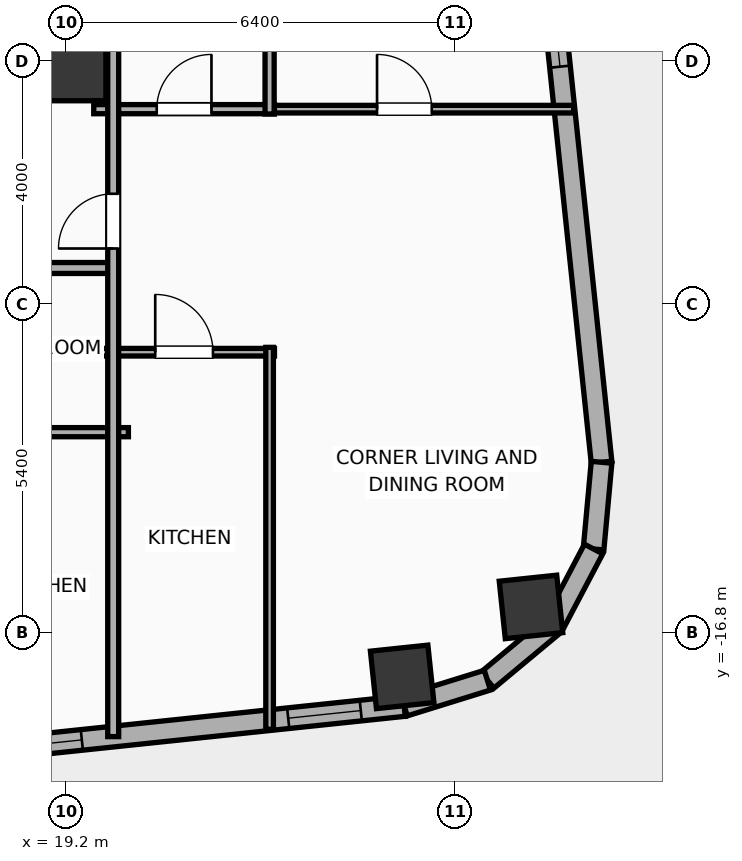
"""IFC4 building model, lengths in metres.
Left out: names, types, materials, properties, quantities, classifications, styles, units other than length and angle.
Written with IfcOpenShell. Run it as: python <this file> out.ifc"""

import sys

from ifc_helpers import new_model, si_unit, direction, frame, frame_2d, origin, origin_2d, place, context, subcontext, project, spatial, rectangle, hollow_rectangle, hollow_circle, extrude, element, fill, save


model = new_model("IFC4")
c1 = context("Model", 3, precision=1e-05, world=origin(), true_north=direction((0.0, 1.0)))
c2 = subcontext(c1, "Body", "Model", "MODEL_VIEW")
j1 = project(units=[si_unit("LENGTHUNIT", "METRE"), si_unit("PLANEANGLEUNIT", "RADIAN")], contexts=[c1])
p1 = place(None, origin())
s1 = spatial("IfcSite", under=j1, at=p1, CompositionType="ELEMENT")
p2 = place(p1, origin())
s2 = spatial("IfcBuilding", under=s1, at=p2, CompositionType="ELEMENT")
p3 = place(p2, frame((0.0, 0.0, 140.4)))
s3 = spatial("IfcBuildingStorey", under=s2, at=p3, CompositionType="ELEMENT", Elevation=140.4)
p4 = place(p3, frame((19.2, -7.4, 0.0), z_axis=(0.0, 0.0, 1.0), x_axis=(1.0, 0.0, 0.0)))
e1 = element("IfcColumn", 1, at=p4, inside=s3, PredefinedType="COLUMN", context=c2, shape_type="SweptSolid", body=[
    extrude(rectangle(XDim=1.3, YDim=1.3, at=origin_2d()), origin(), (0.0, 0.0, 1.0), 3.9),
])
p5 = place(p3, frame((12.125, -7.4, 0.0), z_axis=(0.0, 0.0, 1.0), x_axis=(1.0, 0.0, 0.0)))
e2 = element("IfcWall", 2, at=p5, inside=s3, PredefinedType="SHEAR", context=c2, shape_type="SweptSolid", body=[
    extrude(rectangle(XDim=7.35, YDim=0.55, at=frame_2d((3.675, 0.0))), origin(), (0.0, 0.0, 1.0), 3.65),
])
p6 = place(p3, frame((19.145, -7.4, 0.0), z_axis=(0.0, 0.0, 1.0), x_axis=(0.0, 1.0, 0.0)))
e3 = element("IfcWall", 3, at=p6, inside=s3, PredefinedType="SHEAR", context=c2, shape_type="SweptSolid", body=[
    extrude(rectangle(XDim=14.8, YDim=0.65, at=frame_2d((7.4, 0.0))), origin(), (0.0, 0.0, 1.0), 3.65),
])
p7 = place(p3, frame((24.722, -17.524, -0.4), z_axis=(0.0, 0.0, 1.0), x_axis=(0.994521895368, 0.104528463268, 0.0)))
e4 = element("IfcColumn", 4, at=p7, inside=s3, PredefinedType="COLUMN", context=c2, shape_type="SweptSolid", body=[
    extrude(hollow_rectangle(XDim=0.95, YDim=0.95, WallThickness=0.032, at=origin_2d()), origin(), (0.0, 0.0, 1.0), 4.3),
])
p8 = place(p3, frame((26.841, -16.374, -0.4), z_axis=(0.0, 0.0, 1.0), x_axis=(0.994521895368, 0.104528463268, 0.0)))
e5 = element("IfcColumn", 5, at=p8, inside=s3, PredefinedType="COLUMN", context=c2, shape_type="SweptSolid", body=[
    extrude(hollow_circle(Radius=0.475, WallThickness=0.032, at=origin_2d()), origin(), (0.0, 0.0, 1.0), 4.3),
])
p9 = place(p3, frame((24.756, -18.003, 0.0), z_axis=(0.0, 0.0, 1.0), x_axis=(-0.99452160744, -0.104531202687, 0.0)))
e6 = element("IfcWall", 6, at=p9, inside=s3, PredefinedType="ELEMENTEDWALL", context=c2, shape_type="SweptSolid", body=[
    extrude(rectangle(XDim=51.967, YDim=0.34, at=frame_2d((25.983, 0.0))), origin(), (0.0, 0.0, 1.0), 2.54),
])
p10 = place(p9, frame((14.84, 0.0, 0.0)))
e7 = element("IfcOpeningElement", 7, at=p10, cuts=e6, PredefinedType="OPENING", context=c2, shape_type="SweptSolid", body=[
    extrude(rectangle(XDim=1.5, YDim=2.05, at=frame_2d((0.75, 1.025))), frame((0.0, 0.18, 0.0), z_axis=(0.0, -1.0, 0.0), x_axis=(1.0, 0.0, 0.0)), (0.0, 0.0, 1.0), 0.36),
])
p11 = place(p9, frame((25.633, 0.0, 0.75)))
e8 = element("IfcOpeningElement", 8, at=p11, cuts=e6, PredefinedType="OPENING", context=c2, shape_type="SweptSolid", body=[
    extrude(rectangle(XDim=2.4, YDim=1.63, at=frame_2d((1.2, 0.815))), frame((0.0, 0.18, 0.0), z_axis=(0.0, -1.0, 0.0), x_axis=(1.0, 0.0, 0.0)), (0.0, 0.0, 1.0), 0.36),
])
p12 = place(p9, frame((42.955, 0.0, 0.75)))
e9 = element("IfcOpeningElement", 9, at=p12, cuts=e6, PredefinedType="OPENING", context=c2, shape_type="SweptSolid", body=[
    extrude(rectangle(XDim=2.4, YDim=1.63, at=frame_2d((1.2, 0.815))), frame((0.0, 0.18, 0.0), z_axis=(0.0, -1.0, 0.0), x_axis=(1.0, 0.0, 0.0)), (0.0, 0.0, 1.0), 0.36),
])
p13 = place(p9, frame((34.121, 0.0, 0.75)))
e10 = element("IfcOpeningElement", 10, at=p13, cuts=e6, PredefinedType="OPENING", context=c2, shape_type="SweptSolid", body=[
    extrude(rectangle(XDim=1.2, YDim=1.63, at=frame_2d((0.6, 0.815))), frame((0.0, 0.18, 0.0), z_axis=(0.0, -1.0, 0.0), x_axis=(1.0, 0.0, 0.0)), (0.0, 0.0, 1.0), 0.36),
])
p14 = place(p9, frame((37.092, 0.0, 0.75)))
e11 = element("IfcOpeningElement", 11, at=p14, cuts=e6, PredefinedType="OPENING", context=c2, shape_type="SweptSolid", body=[
    extrude(rectangle(XDim=1.2, YDim=1.63, at=frame_2d((0.6, 0.815))), frame((0.0, 0.18, 0.0), z_axis=(0.0, -1.0, 0.0), x_axis=(1.0, 0.0, 0.0)), (0.0, 0.0, 1.0), 0.36),
])
p15 = place(p9, frame((11.388, 0.0, 0.75)))
e12 = element("IfcOpeningElement", 12, at=p15, cuts=e6, PredefinedType="OPENING", context=c2, shape_type="SweptSolid", body=[
    extrude(rectangle(XDim=1.2, YDim=1.63, at=frame_2d((0.6, 0.815))), frame((0.0, 0.18, 0.0), z_axis=(0.0, -1.0, 0.0), x_axis=(1.0, 0.0, 0.0)), (0.0, 0.0, 1.0), 0.36),
])
p16 = place(p9, frame((8.332, 0.0, 0.75)))
e13 = element("IfcOpeningElement", 13, at=p16, cuts=e6, PredefinedType="OPENING", context=c2, shape_type="SweptSolid", body=[
    extrude(rectangle(XDim=1.2, YDim=1.63, at=frame_2d((0.6, 0.815))), frame((0.0, 0.18, 0.0), z_axis=(0.0, -1.0, 0.0), x_axis=(1.0, 0.0, 0.0)), (0.0, 0.0, 1.0), 0.36),
])
p17 = place(p9, frame((5.331, 0.0, 0.75)))
e14 = element("IfcOpeningElement", 14, at=p17, cuts=e6, PredefinedType="OPENING", context=c2, shape_type="SweptSolid", body=[
    extrude(rectangle(XDim=1.2, YDim=1.63, at=frame_2d((0.6, 0.815))), frame((0.0, 0.18, 0.0), z_axis=(0.0, -1.0, 0.0), x_axis=(1.0, 0.0, 0.0)), (0.0, 0.0, 1.0), 0.36),
])
p18 = place(p9, frame((29.313, 0.0, 0.75)))
e15 = element("IfcOpeningElement", 15, at=p18, cuts=e6, PredefinedType="OPENING", context=c2, shape_type="SweptSolid", body=[
    extrude(rectangle(XDim=1.2, YDim=1.63, at=frame_2d((0.6, 0.815))), frame((0.0, 0.18, 0.0), z_axis=(0.0, -1.0, 0.0), x_axis=(1.0, 0.0, 0.0)), (0.0, 0.0, 1.0), 0.36),
])
p19 = place(p9, frame((22.248, 0.0, 0.75)))
e16 = element("IfcOpeningElement", 16, at=p19, cuts=e6, PredefinedType="OPENING", context=c2, shape_type="SweptSolid", body=[
    extrude(rectangle(XDim=1.2, YDim=1.63, at=frame_2d((0.6, 0.815))), frame((0.0, 0.18, 0.0), z_axis=(0.0, -1.0, 0.0), x_axis=(1.0, 0.0, 0.0)), (0.0, 0.0, 1.0), 0.36),
])
p20 = place(p9, frame((18.186, 0.0, 0.75)))
e17 = element("IfcOpeningElement", 17, at=p20, cuts=e6, PredefinedType="OPENING", context=c2, shape_type="SweptSolid", body=[
    extrude(rectangle(XDim=1.2, YDim=1.63, at=frame_2d((0.6, 0.815))), frame((0.0, 0.18, 0.0), z_axis=(0.0, -1.0, 0.0), x_axis=(1.0, 0.0, 0.0)), (0.0, 0.0, 1.0), 0.36),
])
p21 = place(p9, frame((0.718, 0.0, 0.75)))
e18 = element("IfcOpeningElement", 18, at=p21, cuts=e6, PredefinedType="OPENING", context=c2, shape_type="SweptSolid", body=[
    extrude(rectangle(XDim=1.2, YDim=1.63, at=frame_2d((0.6, 0.815))), frame((0.0, 0.18, 0.0), z_axis=(0.0, -1.0, 0.0), x_axis=(1.0, 0.0, 0.0)), (0.0, 0.0, 1.0), 0.36),
])
p22 = place(p3, frame((24.534, 18.99, 0.0), z_axis=(0.0, 0.0, 1.0), x_axis=(0.104534959766, -0.994521212537, 0.0)))
e19 = element("IfcWall", 19, at=p22, inside=s3, PredefinedType="ELEMENTEDWALL", context=c2, shape_type="SweptSolid", body=[
    extrude(rectangle(XDim=33.166, YDim=0.34, at=frame_2d((16.583, 0.0))), origin(), (0.0, 0.0, 1.0), 2.54),
])
p23 = place(p22, frame((6.542, 0.0, 0.75)))
e20 = element("IfcOpeningElement", 20, at=p23, cuts=e19, PredefinedType="OPENING", context=c2, shape_type="SweptSolid", body=[
    extrude(rectangle(XDim=1.8, YDim=1.63, at=frame_2d((0.9, 0.815))), frame((0.0, 0.18, 0.0), z_axis=(0.0, -1.0, 0.0), x_axis=(1.0, 0.0, 0.0)), (0.0, 0.0, 1.0), 0.36),
])
p24 = place(p22, frame((24.825, 0.0, 0.75)))
e21 = element("IfcOpeningElement", 21, at=p24, cuts=e19, PredefinedType="OPENING", context=c2, shape_type="SweptSolid", body=[
    extrude(rectangle(XDim=1.8, YDim=1.63, at=frame_2d((0.9, 0.815))), frame((0.0, 0.18, 0.0), z_axis=(0.0, -1.0, 0.0), x_axis=(1.0, 0.0, 0.0)), (0.0, 0.0, 1.0), 0.36),
])
p25 = place(p3, frame((28.001, -13.995, 0.0), z_axis=(0.0, 0.0, 1.0), x_axis=(-0.091534682358, -0.995801888894, 0.0)))
e22 = element("IfcWall", 22, at=p25, inside=s3, PredefinedType="ELEMENTEDWALL", context=c2, shape_type="SweptSolid", body=[
    extrude(rectangle(XDim=1.432, YDim=0.34, at=frame_2d((0.716, 0.0))), origin(), (0.0, 0.0, 1.0), 3.65),
])
p26 = place(p3, frame((27.87, -15.421, 0.0), z_axis=(0.0, 0.0, 1.0), x_axis=(-0.465682431293, -0.884951904447, 0.0)))
e23 = element("IfcWall", 23, at=p26, inside=s3, PredefinedType="ELEMENTEDWALL", context=c2, shape_type="SweptSolid", body=[
    extrude(rectangle(XDim=1.415, YDim=0.34, at=frame_2d((0.708, 0.0))), origin(), (0.0, 0.0, 1.0), 3.65),
])
p27 = place(p3, frame((27.211, -16.674, 0.0), z_axis=(0.0, 0.0, 1.0), x_axis=(-0.768758372808, -0.639539337522, 0.0)))
e24 = element("IfcWall", 24, at=p27, inside=s3, PredefinedType="ELEMENTEDWALL", context=c2, shape_type="SweptSolid", body=[
    extrude(rectangle(XDim=1.415, YDim=0.34, at=frame_2d((0.708, 0.0))), origin(), (0.0, 0.0, 1.0), 2.54),
])
p28 = place(p3, frame((26.123, -17.579, 0.0), z_axis=(0.0, 0.0, 1.0), x_axis=(-0.955042500381, -0.296468923271, 0.0)))
e25 = element("IfcWall", 25, at=p28, inside=s3, PredefinedType="ELEMENTEDWALL", context=c2, shape_type="SweptSolid", body=[
    extrude(rectangle(XDim=1.432, YDim=0.34, at=frame_2d((0.716, 0.0))), origin(), (0.0, 0.0, 1.0), 2.54),
])
p29 = place(p3, frame((17.67, -13.5, 0.0), z_axis=(0.0, 0.0, 1.0), x_axis=(1.0, 0.0, 0.0)))
e26 = element("IfcWall", 26, at=p29, inside=s3, PredefinedType="PLUMBINGWALL", context=c2, shape_type="SweptSolid", body=[
    extrude(rectangle(XDim=2.55, YDim=0.15, at=frame_2d((1.275, 0.0))), origin(), (0.0, 0.0, 1.0), 3.65),
])
p30 = place(p3, frame((8.08, -10.8, 0.0), z_axis=(0.0, 0.0, 1.0), x_axis=(1.0, 0.0, 0.0)))
e27 = element("IfcWall", 27, at=p30, inside=s3, PredefinedType="PARTITIONING", context=c2, shape_type="SweptSolid", body=[
    extrude(rectangle(XDim=11.92, YDim=0.18, at=frame_2d((5.96, 0.0))), origin(), (0.0, 0.0, 1.0), 3.65),
])
p31 = place(p30, frame((1.251, 0.0, 0.0)))
e28 = element("IfcOpeningElement", 28, at=p31, cuts=e27, PredefinedType="OPENING", context=c2, shape_type="SweptSolid", body=[
    extrude(rectangle(XDim=1.15, YDim=2.05, at=frame_2d((0.575, 1.025))), frame((0.0, 0.1, 0.0), z_axis=(0.0, -1.0, 0.0), x_axis=(1.0, 0.0, 0.0)), (0.0, 0.0, 1.0), 0.2),
])
p32 = place(p30, frame((7.244, 0.0, 0.0)))
e29 = element("IfcOpeningElement", 29, at=p32, cuts=e27, PredefinedType="OPENING", context=c2, shape_type="SweptSolid", body=[
    extrude(rectangle(XDim=1.15, YDim=2.05, at=frame_2d((0.575, 1.025))), frame((0.0, 0.1, 0.0), z_axis=(0.0, -1.0, 0.0), x_axis=(1.0, 0.0, 0.0)), (0.0, 0.0, 1.0), 0.2),
])
p33 = place(p3, frame((22.482, -8.188, 0.0), z_axis=(0.0, 0.0, 1.0), x_axis=(1.0, 0.0, 0.0)))
e30 = element("IfcWall", 30, at=p33, inside=s3, PredefinedType="PARTITIONING", context=c2, shape_type="SweptSolid", body=[
    extrude(rectangle(XDim=5.06, YDim=0.125, at=frame_2d((2.53, 0.0))), origin(), (0.0, 0.0, 1.0), 3.65),
])
p34 = place(p33, frame((1.827, 0.0, 0.0)))
e31 = element("IfcOpeningElement", 31, at=p34, cuts=e30, PredefinedType="OPENING", context=c2, shape_type="SweptSolid", body=[
    extrude(rectangle(XDim=0.9, YDim=2.05, at=frame_2d((0.45, 1.025))), frame((0.0, 0.073, 0.0), z_axis=(0.0, -1.0, 0.0), x_axis=(1.0, 0.0, 0.0)), (0.0, 0.0, 1.0), 0.145),
])
p35 = place(p3, frame((19.65, -12.185, 0.0), z_axis=(0.0, 0.0, 1.0), x_axis=(1.0, 0.0, 0.0)))
e32 = element("IfcWall", 32, at=p35, inside=s3, PredefinedType="PARTITIONING", context=c2, shape_type="SweptSolid", body=[
    extrude(rectangle(XDim=2.972, YDim=0.125, at=frame_2d((1.486, 0.0))), origin(), (0.0, 0.0, 1.0), 3.65),
])
p36 = place(p35, frame((1.011, 0.0, 0.0)))
e33 = element("IfcOpeningElement", 33, at=p36, cuts=e32, PredefinedType="OPENING", context=c2, shape_type="SweptSolid", body=[
    extrude(rectangle(XDim=0.95, YDim=2.05, at=frame_2d((0.475, 1.025))), frame((0.0, 0.073, 0.0), z_axis=(0.0, -1.0, 0.0), x_axis=(1.0, 0.0, 0.0)), (0.0, 0.0, 1.0), 0.145),
])
p37 = place(p3, frame((19.65, -8.188, 0.0), z_axis=(0.0, 0.0, 1.0), x_axis=(1.0, 0.0, 0.0)))
e34 = element("IfcWall", 34, at=p37, inside=s3, PredefinedType="PLUMBINGWALL", context=c2, shape_type="SweptSolid", body=[
    extrude(rectangle(XDim=2.972, YDim=0.15, at=frame_2d((1.486, 0.0))), origin(), (0.0, 0.0, 1.0), 3.65),
])
p38 = place(p37, frame((1.036, 0.0, 0.0)))
e35 = element("IfcOpeningElement", 35, at=p38, cuts=e34, PredefinedType="OPENING", context=c2, shape_type="SweptSolid", body=[
    extrude(rectangle(XDim=0.9, YDim=2.05, at=frame_2d((0.45, 1.025))), frame((0.0, 0.085, 0.0), z_axis=(0.0, -1.0, 0.0), x_axis=(1.0, 0.0, 0.0)), (0.0, 0.0, 1.0), 0.17),
])
p39 = place(p3, frame((22.542, -18.387, 0.0), z_axis=(0.0, 0.0, 1.0), x_axis=(0.0, 1.0, 0.0)))
e36 = element("IfcWall", 36, at=p39, inside=s3, PredefinedType="PARTITIONING", context=c2, shape_type="SweptSolid", body=[
    extrude(rectangle(XDim=6.282, YDim=0.125, at=frame_2d((3.141, 0.0))), origin(), (0.0, 0.0, 1.0), 3.65),
])
p40 = place(p3, frame((22.542, -8.268, 0.0), z_axis=(0.0, 0.0, 1.0), x_axis=(0.0, 1.0, 0.0)))
e37 = element("IfcWall", 37, at=p40, inside=s3, PredefinedType="PLUMBINGWALL", context=c2, shape_type="SweptSolid", body=[
    extrude(rectangle(XDim=6.448, YDim=0.15, at=frame_2d((3.224, 0.0))), origin(), (0.0, 0.0, 1.0), 3.65),
])
p41 = place(p3, frame((19.97, -18.506, 0.0), z_axis=(0.0, 0.0, 1.0), x_axis=(0.0, 1.0, 0.0)))
e38 = element("IfcWall", 38, at=p41, inside=s3, PredefinedType="PARTITIONING", context=c2, shape_type="SweptSolid", body=[
    extrude(rectangle(XDim=16.706, YDim=0.18, at=frame_2d((8.353, 0.0))), origin(), (0.0, 0.0, 1.0), 3.65),
])
p42 = place(p41, frame((8.027, 0.0, 0.0)))
e39 = element("IfcOpeningElement", 39, at=p42, cuts=e38, PredefinedType="OPENING", context=c2, shape_type="SweptSolid", body=[
    extrude(rectangle(XDim=0.9, YDim=2.05, at=frame_2d((0.45, 1.025))), frame((0.0, 0.1, 0.0), z_axis=(0.0, -1.0, 0.0), x_axis=(1.0, 0.0, 0.0)), (0.0, 0.0, 1.0), 0.2),
])
p43 = place(p24, origin())
e40 = element("IfcWindow", 40, at=p43, inside=s3, PartitioningType="SINGLE_PANEL", PredefinedType="WINDOW", context=c2, shape_type="SweptSolid", body=[
    extrude(rectangle(XDim=1.8, YDim=1.63, at=frame_2d((0.9, 0.815))), frame((0.0, 0.03, 0.0), z_axis=(0.0, -1.0, 0.0), x_axis=(1.0, 0.0, 0.0)), (0.0, 0.0, 1.0), 0.06),
])
fill(e21, e40)
p44 = place(p17, origin())
e41 = element("IfcWindow", 41, at=p44, inside=s3, PartitioningType="SINGLE_PANEL", PredefinedType="WINDOW", context=c2, shape_type="SweptSolid", body=[
    extrude(rectangle(XDim=1.2, YDim=1.63, at=frame_2d((0.6, 0.815))), frame((0.0, 0.03, 0.0), z_axis=(0.0, -1.0, 0.0), x_axis=(1.0, 0.0, 0.0)), (0.0, 0.0, 1.0), 0.06),
])
fill(e14, e41)
p45 = place(p21, origin())
e42 = element("IfcWindow", 42, at=p45, inside=s3, PartitioningType="SINGLE_PANEL", PredefinedType="WINDOW", context=c2, shape_type="SweptSolid", body=[
    extrude(rectangle(XDim=1.2, YDim=1.63, at=frame_2d((0.6, 0.815))), frame((0.0, 0.03, 0.0), z_axis=(0.0, -1.0, 0.0), x_axis=(1.0, 0.0, 0.0)), (0.0, 0.0, 1.0), 0.06),
])
fill(e18, e42)
p46 = place(p34, origin())
e43 = element("IfcDoor", 43, at=p46, inside=s3, OperationType="SINGLE_SWING_LEFT", PredefinedType="DOOR", context=c2, shape_type="SweptSolid", body=[
    extrude(rectangle(XDim=0.9, YDim=2.05, at=frame_2d((0.45, 1.025))), frame((0.0, 0.025, 0.0), z_axis=(0.0, -1.0, 0.0), x_axis=(1.0, 0.0, 0.0)), (0.0, 0.0, 1.0), 0.05),
])
fill(e31, e43)
p47 = place(p36, origin())
e44 = element("IfcDoor", 44, at=p47, inside=s3, OperationType="SINGLE_SWING_LEFT", PredefinedType="DOOR", context=c2, shape_type="SweptSolid", body=[
    extrude(rectangle(XDim=0.95, YDim=2.05, at=frame_2d((0.475, 1.025))), frame((0.0, 0.025, 0.0), z_axis=(0.0, -1.0, 0.0), x_axis=(1.0, 0.0, 0.0)), (0.0, 0.0, 1.0), 0.05),
])
fill(e33, e44)
p48 = place(p38, origin())
e45 = element("IfcDoor", 45, at=p48, inside=s3, OperationType="SINGLE_SWING_RIGHT", PredefinedType="DOOR", context=c2, shape_type="SweptSolid", body=[
    extrude(rectangle(XDim=0.9, YDim=2.05, at=frame_2d((0.45, 1.025))), frame((0.0, 0.025, 0.0), z_axis=(0.0, -1.0, 0.0), x_axis=(1.0, 0.0, 0.0)), (0.0, 0.0, 1.0), 0.05),
])
fill(e35, e45)
p49 = place(p42, origin())
e46 = element("IfcDoor", 46, at=p49, inside=s3, OperationType="SINGLE_SWING_LEFT", PredefinedType="DOOR", context=c2, shape_type="SweptSolid", body=[
    extrude(rectangle(XDim=0.9, YDim=2.05, at=frame_2d((0.45, 1.025))), frame((0.0, 0.025, 0.0), z_axis=(0.0, -1.0, 0.0), x_axis=(1.0, 0.0, 0.0)), (0.0, 0.0, 1.0), 0.05),
])
fill(e39, e46)
save(model, sys.argv[1])
